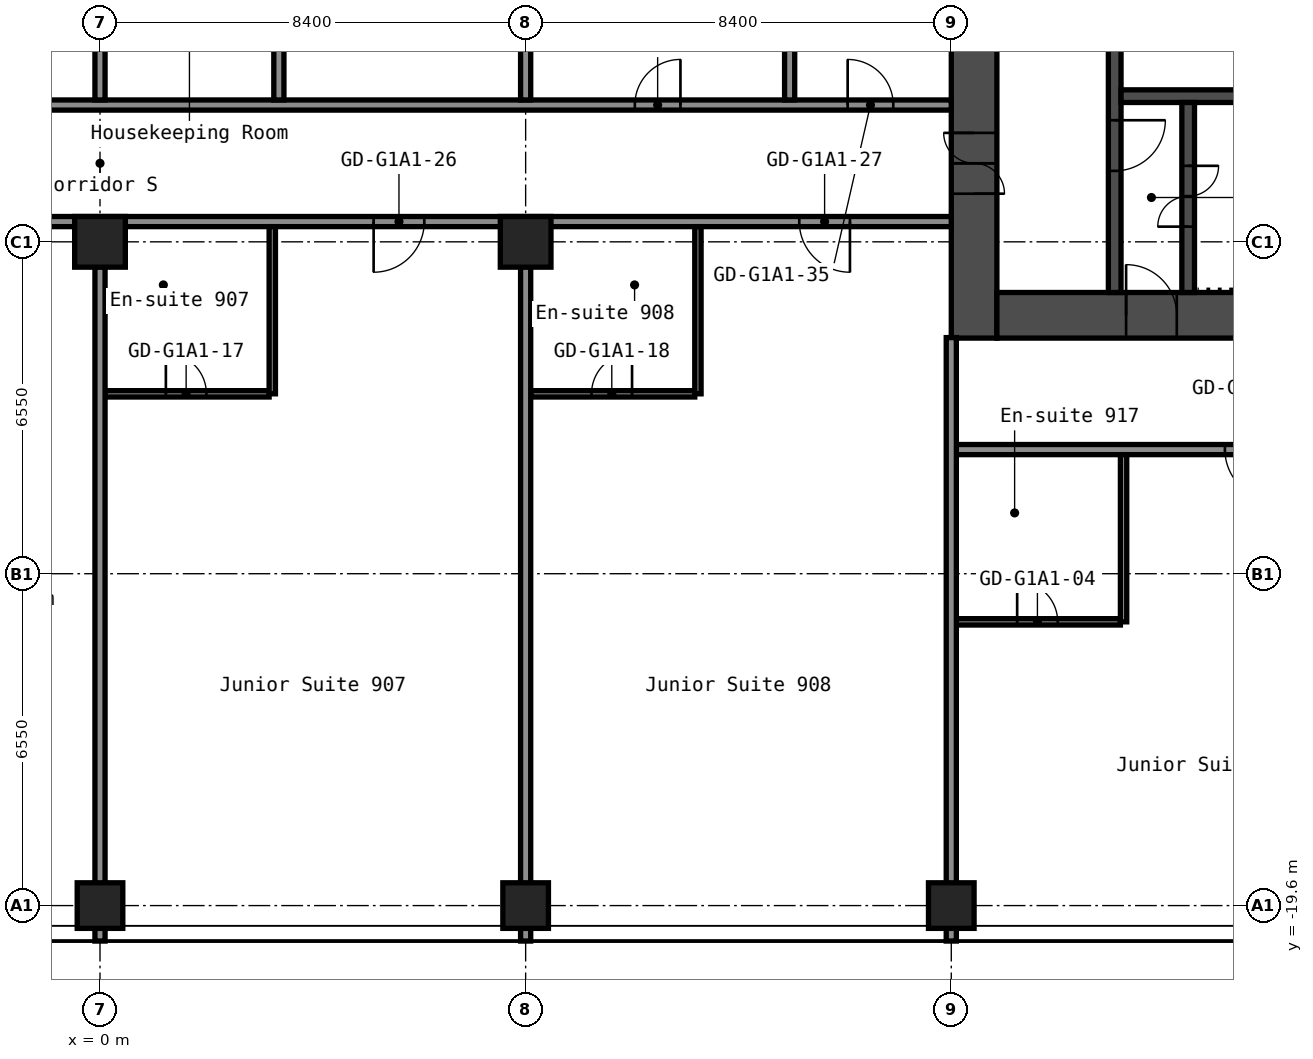
"""IFC4 building model, lengths in metres.
Left out: names, types, materials, properties, quantities, classifications, styles, units other than length and angle.
Written with IfcOpenShell. Run it as: python <this file> out.ifc"""

import sys

from ifc_helpers import new_model, si_unit, direction, frame, frame_2d, origin, origin_2d, place, context, subcontext, project, spatial, rectangle, hollow_rectangle, extrude, element, fill, save


model = new_model("IFC4")
c1 = context("Model", 3, precision=1e-05, world=origin(), true_north=direction((0.0, 1.0)))
c2 = subcontext(c1, "Body", "Model", "MODEL_VIEW")
j1 = project(units=[si_unit("LENGTHUNIT", "METRE"), si_unit("PLANEANGLEUNIT", "RADIAN")], contexts=[c1])
p1 = place(None, origin())
s1 = spatial("IfcSite", under=j1, at=p1, CompositionType="ELEMENT")
p2 = place(p1, origin())
s2 = spatial("IfcBuilding", under=s1, at=p2, CompositionType="ELEMENT")
p3 = place(p2, frame((0.0, 0.0, 35.8)))
s3 = spatial("IfcBuildingStorey", under=s2, at=p3, CompositionType="ELEMENT", Elevation=35.8)
p4 = place(p3, frame((0.0, -19.6, 0.0), z_axis=(0.0, 0.0, 1.0), x_axis=(1.0, 0.0, 0.0)))
e1 = element("IfcColumn", 1, at=p4, inside=s3, PredefinedType="COLUMN", context=c2, shape_type="SweptSolid", body=[
    extrude(hollow_rectangle(XDim=0.9, YDim=0.9, WallThickness=0.036, at=origin_2d()), origin(), (0.0, 0.0, 1.0), 2.8),
])
p5 = place(p3, frame((0.0, -6.5, 0.0), z_axis=(0.0, 0.0, 1.0), x_axis=(1.0, 0.0, 0.0)))
e2 = element("IfcColumn", 2, at=p5, inside=s3, PredefinedType="COLUMN", context=c2, shape_type="SweptSolid", body=[
    extrude(hollow_rectangle(XDim=1.0, YDim=1.0, WallThickness=0.04, at=origin_2d()), origin(), (0.0, 0.0, 1.0), 2.8),
])
p6 = place(p3, frame((8.4, -19.6, 0.0), z_axis=(0.0, 0.0, 1.0), x_axis=(1.0, 0.0, 0.0)))
e3 = element("IfcColumn", 3, at=p6, inside=s3, PredefinedType="COLUMN", context=c2, shape_type="SweptSolid", body=[
    extrude(hollow_rectangle(XDim=0.9, YDim=0.9, WallThickness=0.036, at=origin_2d()), origin(), (0.0, 0.0, 1.0), 2.8),
])
p7 = place(p3, frame((8.4, -6.5, 0.0), z_axis=(0.0, 0.0, 1.0), x_axis=(1.0, 0.0, 0.0)))
e4 = element("IfcColumn", 4, at=p7, inside=s3, PredefinedType="COLUMN", context=c2, shape_type="SweptSolid", body=[
    extrude(hollow_rectangle(XDim=1.0, YDim=1.0, WallThickness=0.04, at=origin_2d()), origin(), (0.0, 0.0, 1.0), 2.8),
])
p8 = place(p3, frame((16.8, -19.6, 0.0), z_axis=(0.0, 0.0, 1.0), x_axis=(1.0, 0.0, 0.0)))
e5 = element("IfcColumn", 5, at=p8, inside=s3, PredefinedType="COLUMN", context=c2, shape_type="SweptSolid", body=[
    extrude(hollow_rectangle(XDim=0.9, YDim=0.9, WallThickness=0.036, at=origin_2d()), origin(), (0.0, 0.0, 1.0), 2.8),
])
p9 = place(p3, frame((17.25, -8.4, 0.0), z_axis=(0.0, 0.0, 1.0), x_axis=(0.0, 1.0, 0.0)))
e6 = element("IfcWall", 6, at=p9, inside=s3, PredefinedType="SHEAR", context=c2, shape_type="SweptSolid", body=[
    extrude(rectangle(XDim=16.8, YDim=0.9, at=frame_2d((8.4, 0.0))), origin(), (0.0, 0.0, 1.0), 2.8),
])
p10 = place(p9, frame((12.75, 0.0, 0.0)))
e7 = element("IfcOpeningElement", 7, at=p10, cuts=e6, PredefinedType="OPENING", context=c2, shape_type="SweptSolid", body=[
    extrude(rectangle(XDim=1.2, YDim=2.1, at=frame_2d((0.6, 1.05))), frame((0.0, 0.46, 0.0), z_axis=(0.0, -1.0, 0.0), x_axis=(1.0, 0.0, 0.0)), (0.0, 0.0, 1.0), 0.92),
])
p11 = place(p9, frame((2.85, 0.0, 0.0)))
e8 = element("IfcOpeningElement", 8, at=p11, cuts=e6, PredefinedType="OPENING", context=c2, shape_type="SweptSolid", body=[
    extrude(rectangle(XDim=1.2, YDim=2.1, at=frame_2d((0.6, 1.05))), frame((0.0, 0.46, 0.0), z_axis=(0.0, -1.0, 0.0), x_axis=(1.0, 0.0, 0.0)), (0.0, 0.0, 1.0), 0.92),
])
p12 = place(p3, frame((17.7, -7.95, 0.0), z_axis=(0.0, 0.0, 1.0), x_axis=(1.0, 0.0, 0.0)))
e9 = element("IfcWall", 9, at=p12, inside=s3, PredefinedType="SHEAR", context=c2, shape_type="SweptSolid", body=[
    extrude(rectangle(XDim=15.0, YDim=0.9, at=frame_2d((7.5, 0.0))), origin(), (0.0, 0.0, 1.0), 2.8),
])
p13 = place(p12, frame((2.55, 0.0, 0.0)))
e10 = element("IfcOpeningElement", 10, at=p13, cuts=e9, PredefinedType="OPENING", context=c2, shape_type="SweptSolid", body=[
    extrude(rectangle(XDim=1.0, YDim=2.1, at=frame_2d((0.5, 1.05))), frame((0.0, 0.46, 0.0), z_axis=(0.0, -1.0, 0.0), x_axis=(1.0, 0.0, 0.0)), (0.0, 0.0, 1.0), 0.92),
])
p14 = place(p3, frame((20.025, -7.5, 0.0), z_axis=(0.0, 0.0, 1.0), x_axis=(0.0, 1.0, 0.0)))
e11 = element("IfcWall", 11, at=p14, inside=s3, PredefinedType="SHEAR", context=c2, shape_type="SweptSolid", body=[
    extrude(rectangle(XDim=6.3, YDim=0.25, at=frame_2d((3.15, 0.0))), origin(), (0.0, 0.0, 1.0), 2.8),
])
p15 = place(p14, frame((2.4, 0.0, 0.0)))
e12 = element("IfcOpeningElement", 12, at=p15, cuts=e11, PredefinedType="OPENING", context=c2, shape_type="SweptSolid", body=[
    extrude(rectangle(XDim=1.0, YDim=2.1, at=frame_2d((0.5, 1.05))), frame((0.0, 0.135, 0.0), z_axis=(0.0, -1.0, 0.0), x_axis=(1.0, 0.0, 0.0)), (0.0, 0.0, 1.0), 0.27),
])
p16 = place(p3, frame((20.15, -3.625, 0.0), z_axis=(0.0, 0.0, 1.0), x_axis=(1.0, 0.0, 0.0)))
e13 = element("IfcWall", 13, at=p16, inside=s3, PredefinedType="SHEAR", context=c2, shape_type="SweptSolid", body=[
    extrude(rectangle(XDim=7.5, YDim=0.25, at=frame_2d((3.75, 0.0))), origin(), (0.0, 0.0, 1.0), 2.8),
])
p17 = place(p3, frame((21.475, -7.5, 0.0), z_axis=(0.0, 0.0, 1.0), x_axis=(0.0, 1.0, 0.0)))
e14 = element("IfcWall", 14, at=p17, inside=s3, PredefinedType="SHEAR", context=c2, shape_type="SweptSolid", body=[
    extrude(rectangle(XDim=3.75, YDim=0.25, at=frame_2d((1.875, 0.0))), origin(), (0.0, 0.0, 1.0), 2.8),
])
p18 = place(p17, frame((1.3, 0.0, 0.0)))
e15 = element("IfcOpeningElement", 15, at=p18, cuts=e14, PredefinedType="OPENING", context=c2, shape_type="SweptSolid", body=[
    extrude(rectangle(XDim=1.2, YDim=2.1, at=frame_2d((0.6, 1.05))), frame((0.0, 0.135, 0.0), z_axis=(0.0, -1.0, 0.0), x_axis=(1.0, 0.0, 0.0)), (0.0, 0.0, 1.0), 0.27),
])
p19 = place(p3, frame((16.9, -14.0, 0.0), z_axis=(0.0, 0.0, 1.0), x_axis=(1.0, 0.0, 0.0)))
e16 = element("IfcWall", 16, at=p19, inside=s3, PredefinedType="PARTITIONING", context=c2, shape_type="SweptSolid", body=[
    extrude(rectangle(XDim=3.238, YDim=0.125, at=frame_2d((1.619, 0.0))), origin(), (0.0, 0.0, 1.0), 2.8),
])
p20 = place(p19, frame((1.2, 0.0, 0.0)))
e17 = element("IfcOpeningElement", 17, at=p20, cuts=e16, PredefinedType="OPENING", context=c2, shape_type="SweptSolid", body=[
    extrude(rectangle(XDim=0.8, YDim=2.1, at=frame_2d((0.4, 1.05))), frame((0.0, 0.073, 0.0), z_axis=(0.0, -1.0, 0.0), x_axis=(1.0, 0.0, 0.0)), (0.0, 0.0, 1.0), 0.145),
])
p21 = place(p3, frame((16.8, -10.6, 0.0), z_axis=(0.0, 0.0, 1.0), x_axis=(1.0, 0.0, 0.0)))
e18 = element("IfcWall", 18, at=p21, inside=s3, PredefinedType="PARTITIONING", context=c2, shape_type="SweptSolid", body=[
    extrude(rectangle(XDim=34.3, YDim=0.2, at=frame_2d((17.15, 0.0))), origin(), (0.0, 0.0, 1.0), 2.8),
])
p22 = place(p21, frame((5.4, 0.0, 0.0)))
e19 = element("IfcOpeningElement", 19, at=p22, cuts=e18, PredefinedType="OPENING", context=c2, shape_type="SweptSolid", body=[
    extrude(rectangle(XDim=1.0, YDim=2.1, at=frame_2d((0.5, 1.05))), frame((0.0, 0.11, 0.0), z_axis=(0.0, -1.0, 0.0), x_axis=(1.0, 0.0, 0.0)), (0.0, 0.0, 1.0), 0.22),
])
p23 = place(p21, frame((13.8, 0.0, 0.0)))
e20 = element("IfcOpeningElement", 20, at=p23, cuts=e18, PredefinedType="OPENING", context=c2, shape_type="SweptSolid", body=[
    extrude(rectangle(XDim=1.0, YDim=2.1, at=frame_2d((0.5, 1.05))), frame((0.0, 0.11, 0.0), z_axis=(0.0, -1.0, 0.0), x_axis=(1.0, 0.0, 0.0)), (0.0, 0.0, 1.0), 0.22),
])
p24 = place(p21, frame((18.8, 0.0, 0.0)))
e21 = element("IfcOpeningElement", 21, at=p24, cuts=e18, PredefinedType="OPENING", context=c2, shape_type="SweptSolid", body=[
    extrude(rectangle(XDim=1.0, YDim=2.1, at=frame_2d((0.5, 1.05))), frame((0.0, 0.11, 0.0), z_axis=(0.0, -1.0, 0.0), x_axis=(1.0, 0.0, 0.0)), (0.0, 0.0, 1.0), 0.22),
])
p25 = place(p21, frame((30.8, 0.0, 0.0)))
e22 = element("IfcOpeningElement", 22, at=p25, cuts=e18, PredefinedType="OPENING", context=c2, shape_type="SweptSolid", body=[
    extrude(rectangle(XDim=1.0, YDim=2.1, at=frame_2d((0.5, 1.05))), frame((0.0, 0.11, 0.0), z_axis=(0.0, -1.0, 0.0), x_axis=(1.0, 0.0, 0.0)), (0.0, 0.0, 1.0), 0.22),
])
p26 = place(p3, frame((0.1, -9.5, 0.0), z_axis=(0.0, 0.0, 1.0), x_axis=(1.0, 0.0, 0.0)))
e23 = element("IfcWall", 23, at=p26, inside=s3, PredefinedType="PARTITIONING", context=c2, shape_type="SweptSolid", body=[
    extrude(rectangle(XDim=3.237, YDim=0.125, at=frame_2d((1.619, 0.0))), origin(), (0.0, 0.0, 1.0), 2.8),
])
p27 = place(p26, frame((1.2, 0.0, 0.0)))
e24 = element("IfcOpeningElement", 24, at=p27, cuts=e23, PredefinedType="OPENING", context=c2, shape_type="SweptSolid", body=[
    extrude(rectangle(XDim=0.8, YDim=2.1, at=frame_2d((0.4, 1.05))), frame((0.0, 0.073, 0.0), z_axis=(0.0, -1.0, 0.0), x_axis=(1.0, 0.0, 0.0)), (0.0, 0.0, 1.0), 0.145),
])
p28 = place(p3, frame((8.5, -9.5, 0.0), z_axis=(0.0, 0.0, 1.0), x_axis=(1.0, 0.0, 0.0)))
e25 = element("IfcWall", 25, at=p28, inside=s3, PredefinedType="PARTITIONING", context=c2, shape_type="SweptSolid", body=[
    extrude(rectangle(XDim=3.238, YDim=0.125, at=frame_2d((1.619, 0.0))), origin(), (0.0, 0.0, 1.0), 2.8),
])
p29 = place(p28, frame((1.2, 0.0, 0.0)))
e26 = element("IfcOpeningElement", 26, at=p29, cuts=e25, PredefinedType="OPENING", context=c2, shape_type="SweptSolid", body=[
    extrude(rectangle(XDim=0.8, YDim=2.1, at=frame_2d((0.4, 1.05))), frame((0.0, 0.073, 0.0), z_axis=(0.0, -1.0, 0.0), x_axis=(1.0, 0.0, 0.0)), (0.0, 0.0, 1.0), 0.145),
])
p30 = place(p3, frame((-16.8, -6.1, 0.0), z_axis=(0.0, 0.0, 1.0), x_axis=(1.0, 0.0, 0.0)))
e27 = element("IfcWall", 27, at=p30, inside=s3, PredefinedType="PARTITIONING", context=c2, shape_type="SweptSolid", body=[
    extrude(rectangle(XDim=33.6, YDim=0.2, at=frame_2d((16.8, 0.0))), origin(), (0.0, 0.0, 1.0), 2.8),
])
p31 = place(p30, frame((5.4, 0.0, 0.0)))
e28 = element("IfcOpeningElement", 28, at=p31, cuts=e27, PredefinedType="OPENING", context=c2, shape_type="SweptSolid", body=[
    extrude(rectangle(XDim=1.0, YDim=2.1, at=frame_2d((0.5, 1.05))), frame((0.0, 0.11, 0.0), z_axis=(0.0, -1.0, 0.0), x_axis=(1.0, 0.0, 0.0)), (0.0, 0.0, 1.0), 0.22),
])
p32 = place(p30, frame((9.545, 0.0, 0.0)))
e29 = element("IfcOpeningElement", 29, at=p32, cuts=e27, PredefinedType="OPENING", context=c2, shape_type="SweptSolid", body=[
    extrude(rectangle(XDim=0.9, YDim=2.1, at=frame_2d((0.45, 1.05))), frame((0.0, 0.11, 0.0), z_axis=(0.0, -1.0, 0.0), x_axis=(1.0, 0.0, 0.0)), (0.0, 0.0, 1.0), 0.22),
])
p33 = place(p30, frame((13.745, 0.0, 0.0)))
e30 = element("IfcOpeningElement", 30, at=p33, cuts=e27, PredefinedType="OPENING", context=c2, shape_type="SweptSolid", body=[
    extrude(rectangle(XDim=0.9, YDim=2.1, at=frame_2d((0.45, 1.05))), frame((0.0, 0.11, 0.0), z_axis=(0.0, -1.0, 0.0), x_axis=(1.0, 0.0, 0.0)), (0.0, 0.0, 1.0), 0.22),
])
p34 = place(p30, frame((22.2, 0.0, 0.0)))
e31 = element("IfcOpeningElement", 31, at=p34, cuts=e27, PredefinedType="OPENING", context=c2, shape_type="SweptSolid", body=[
    extrude(rectangle(XDim=1.0, YDim=2.1, at=frame_2d((0.5, 1.05))), frame((0.0, 0.11, 0.0), z_axis=(0.0, -1.0, 0.0), x_axis=(1.0, 0.0, 0.0)), (0.0, 0.0, 1.0), 0.22),
])
p35 = place(p30, frame((30.6, 0.0, 0.0)))
e32 = element("IfcOpeningElement", 32, at=p35, cuts=e27, PredefinedType="OPENING", context=c2, shape_type="SweptSolid", body=[
    extrude(rectangle(XDim=1.0, YDim=2.1, at=frame_2d((0.5, 1.05))), frame((0.0, 0.11, 0.0), z_axis=(0.0, -1.0, 0.0), x_axis=(1.0, 0.0, 0.0)), (0.0, 0.0, 1.0), 0.22),
])
p36 = place(p3, frame((-16.8, -3.8, 0.0), z_axis=(0.0, 0.0, 1.0), x_axis=(1.0, 0.0, 0.0)))
e33 = element("IfcWall", 33, at=p36, inside=s3, PredefinedType="PARTITIONING", context=c2, shape_type="SweptSolid", body=[
    extrude(rectangle(XDim=33.6, YDim=0.2, at=frame_2d((16.8, 0.0))), origin(), (0.0, 0.0, 1.0), 2.8),
])
p37 = place(p36, frame((9.8, 0.0, 0.0)))
e34 = element("IfcOpeningElement", 34, at=p37, cuts=e33, PredefinedType="OPENING", context=c2, shape_type="SweptSolid", body=[
    extrude(rectangle(XDim=0.9, YDim=2.1, at=frame_2d((0.45, 1.05))), frame((0.0, 0.11, 0.0), z_axis=(0.0, -1.0, 0.0), x_axis=(1.0, 0.0, 0.0)), (0.0, 0.0, 1.0), 0.22),
])
p38 = place(p36, frame((14.0, 0.0, 0.0)))
e35 = element("IfcOpeningElement", 35, at=p38, cuts=e33, PredefinedType="OPENING", context=c2, shape_type="SweptSolid", body=[
    extrude(rectangle(XDim=0.9, YDim=2.1, at=frame_2d((0.45, 1.05))), frame((0.0, 0.11, 0.0), z_axis=(0.0, -1.0, 0.0), x_axis=(1.0, 0.0, 0.0)), (0.0, 0.0, 1.0), 0.22),
])
p39 = place(p36, frame((27.355, 0.0, 0.0)))
e36 = element("IfcOpeningElement", 36, at=p39, cuts=e33, PredefinedType="OPENING", context=c2, shape_type="SweptSolid", body=[
    extrude(rectangle(XDim=0.9, YDim=2.1, at=frame_2d((0.45, 1.05))), frame((0.0, 0.11, 0.0), z_axis=(0.0, -1.0, 0.0), x_axis=(1.0, 0.0, 0.0)), (0.0, 0.0, 1.0), 0.22),
])
p40 = place(p36, frame((31.555, 0.0, 0.0)))
e37 = element("IfcOpeningElement", 37, at=p40, cuts=e33, PredefinedType="OPENING", context=c2, shape_type="SweptSolid", body=[
    extrude(rectangle(XDim=0.9, YDim=2.1, at=frame_2d((0.45, 1.05))), frame((0.0, 0.11, 0.0), z_axis=(0.0, -1.0, 0.0), x_axis=(1.0, 0.0, 0.0)), (0.0, 0.0, 1.0), 0.22),
])
p41 = place(p3, frame((0.0, -20.3, 0.0), z_axis=(0.0, 0.0, 1.0), x_axis=(0.0, 1.0, 0.0)))
e38 = element("IfcWall", 38, at=p41, inside=s3, PredefinedType="PARTITIONING", context=c2, shape_type="SweptSolid", body=[
    extrude(rectangle(XDim=13.31, YDim=0.2, at=frame_2d((6.655, 0.0))), origin(), (0.0, 0.0, 1.0), 2.8),
])
p42 = place(p3, frame((0.0, -3.7, 0.0), z_axis=(0.0, 0.0, 1.0), x_axis=(0.0, 1.0, 0.0)))
e39 = element("IfcWall", 39, at=p42, inside=s3, PredefinedType="PARTITIONING", context=c2, shape_type="SweptSolid", body=[
    extrude(rectangle(XDim=7.4, YDim=0.2, at=frame_2d((3.7, 0.0))), origin(), (0.0, 0.0, 1.0), 2.8),
])
p43 = place(p3, frame((3.4, -9.5, 0.0), z_axis=(0.0, 0.0, 1.0), x_axis=(0.0, 1.0, 0.0)))
e40 = element("IfcWall", 40, at=p43, inside=s3, PredefinedType="PARTITIONING", context=c2, shape_type="SweptSolid", body=[
    extrude(rectangle(XDim=3.3, YDim=0.125, at=frame_2d((1.65, 0.0))), origin(), (0.0, 0.0, 1.0), 2.8),
])
p44 = place(p3, frame((3.53, -3.7, 0.0), z_axis=(0.0, 0.0, 1.0), x_axis=(0.0, 1.0, 0.0)))
e41 = element("IfcWall", 41, at=p44, inside=s3, PredefinedType="PARTITIONING", context=c2, shape_type="SweptSolid", body=[
    extrude(rectangle(XDim=7.4, YDim=0.2, at=frame_2d((3.7, 0.0))), origin(), (0.0, 0.0, 1.0), 2.8),
])
p45 = place(p3, frame((8.4, -20.3, 0.0), z_axis=(0.0, 0.0, 1.0), x_axis=(0.0, 1.0, 0.0)))
e42 = element("IfcWall", 42, at=p45, inside=s3, PredefinedType="PARTITIONING", context=c2, shape_type="SweptSolid", body=[
    extrude(rectangle(XDim=13.31, YDim=0.2, at=frame_2d((6.655, 0.0))), origin(), (0.0, 0.0, 1.0), 2.8),
])
p46 = place(p3, frame((8.4, -3.7, 0.0), z_axis=(0.0, 0.0, 1.0), x_axis=(0.0, 1.0, 0.0)))
e43 = element("IfcWall", 43, at=p46, inside=s3, PredefinedType="PARTITIONING", context=c2, shape_type="SweptSolid", body=[
    extrude(rectangle(XDim=7.4, YDim=0.2, at=frame_2d((3.7, 0.0))), origin(), (0.0, 0.0, 1.0), 2.8),
])
p47 = place(p3, frame((11.8, -9.5, 0.0), z_axis=(0.0, 0.0, 1.0), x_axis=(0.0, 1.0, 0.0)))
e44 = element("IfcWall", 44, at=p47, inside=s3, PredefinedType="PARTITIONING", context=c2, shape_type="SweptSolid", body=[
    extrude(rectangle(XDim=3.3, YDim=0.125, at=frame_2d((1.65, 0.0))), origin(), (0.0, 0.0, 1.0), 2.8),
])
p48 = place(p3, frame((13.61, -3.7, 0.0), z_axis=(0.0, 0.0, 1.0), x_axis=(0.0, 1.0, 0.0)))
e45 = element("IfcWall", 45, at=p48, inside=s3, PredefinedType="PARTITIONING", context=c2, shape_type="SweptSolid", body=[
    extrude(rectangle(XDim=7.4, YDim=0.2, at=frame_2d((3.7, 0.0))), origin(), (0.0, 0.0, 1.0), 2.8),
])
p49 = place(p3, frame((16.8, -20.3, 0.0), z_axis=(0.0, 0.0, 1.0), x_axis=(0.0, 1.0, 0.0)))
e46 = element("IfcWall", 46, at=p49, inside=s3, PredefinedType="PARTITIONING", context=c2, shape_type="SweptSolid", body=[
    extrude(rectangle(XDim=11.91, YDim=0.2, at=frame_2d((5.955, 0.0))), origin(), (0.0, 0.0, 1.0), 2.8),
])
p50 = place(p3, frame((20.2, -14.0, 0.0), z_axis=(0.0, 0.0, 1.0), x_axis=(0.0, 1.0, 0.0)))
e47 = element("IfcWall", 47, at=p50, inside=s3, PredefinedType="PARTITIONING", context=c2, shape_type="SweptSolid", body=[
    extrude(rectangle(XDim=3.3, YDim=0.125, at=frame_2d((1.65, 0.0))), origin(), (0.0, 0.0, 1.0), 2.8),
])
p51 = place(p11, origin())
e48 = element("IfcDoor", 48, at=p51, inside=s3, OperationType="DOUBLE_DOOR_SINGLE_SWING", PredefinedType="DOOR", context=c2, shape_type="SweptSolid", body=[
    extrude(rectangle(XDim=1.2, YDim=2.1, at=frame_2d((0.6, 1.05))), frame((0.0, 0.025, 0.0), z_axis=(0.0, -1.0, 0.0), x_axis=(1.0, 0.0, 0.0)), (0.0, 0.0, 1.0), 0.05),
])
fill(e8, e48)
p52 = place(p13, origin())
e49 = element("IfcDoor", 49, at=p52, inside=s3, OperationType="SINGLE_SWING_RIGHT", PredefinedType="DOOR", context=c2, shape_type="SweptSolid", body=[
    extrude(rectangle(XDim=1.0, YDim=2.1, at=frame_2d((0.5, 1.05))), frame((0.0, 0.025, 0.0), z_axis=(0.0, -1.0, 0.0), x_axis=(1.0, 0.0, 0.0)), (0.0, 0.0, 1.0), 0.05),
])
fill(e10, e49)
p53 = place(p18, origin())
e50 = element("IfcDoor", 50, at=p53, inside=s3, OperationType="DOUBLE_DOOR_SINGLE_SWING", PredefinedType="DOOR", context=c2, shape_type="SweptSolid", body=[
    extrude(rectangle(XDim=1.2, YDim=2.1, at=frame_2d((0.6, 1.05))), frame((0.0, 0.025, 0.0), z_axis=(0.0, -1.0, 0.0), x_axis=(1.0, 0.0, 0.0)), (0.0, 0.0, 1.0), 0.05),
])
fill(e15, e50)
p54 = place(p15, origin())
e51 = element("IfcDoor", 51, at=p54, inside=s3, OperationType="SINGLE_SWING_RIGHT", PredefinedType="DOOR", context=c2, shape_type="SweptSolid", body=[
    extrude(rectangle(XDim=1.0, YDim=2.1, at=frame_2d((0.5, 1.05))), frame((0.0, 0.025, 0.0), z_axis=(0.0, -1.0, 0.0), x_axis=(1.0, 0.0, 0.0)), (0.0, 0.0, 1.0), 0.05),
])
fill(e12, e51)
p55 = place(p20, origin())
e52 = element("IfcDoor", 52, at=p55, inside=s3, OperationType="SINGLE_SWING_RIGHT", PredefinedType="DOOR", context=c2, shape_type="SweptSolid", body=[
    extrude(rectangle(XDim=0.8, YDim=2.1, at=frame_2d((0.4, 1.05))), frame((0.0, 0.025, 0.0), z_axis=(0.0, -1.0, 0.0), x_axis=(1.0, 0.0, 0.0)), (0.0, 0.0, 1.0), 0.05),
])
fill(e17, e52)
p56 = place(p22, origin())
e53 = element("IfcDoor", 53, at=p56, inside=s3, OperationType="SINGLE_SWING_RIGHT", PredefinedType="DOOR", context=c2, shape_type="SweptSolid", body=[
    extrude(rectangle(XDim=1.0, YDim=2.1, at=frame_2d((0.5, 1.05))), frame((0.0, 0.025, 0.0), z_axis=(0.0, -1.0, 0.0), x_axis=(1.0, 0.0, 0.0)), (0.0, 0.0, 1.0), 0.05),
])
fill(e19, e53)
p57 = place(p27, origin())
e54 = element("IfcDoor", 54, at=p57, inside=s3, OperationType="SINGLE_SWING_RIGHT", PredefinedType="DOOR", context=c2, shape_type="SweptSolid", body=[
    extrude(rectangle(XDim=0.8, YDim=2.1, at=frame_2d((0.4, 1.05))), frame((0.0, 0.025, 0.0), z_axis=(0.0, -1.0, 0.0), x_axis=(1.0, 0.0, 0.0)), (0.0, 0.0, 1.0), 0.05),
])
fill(e24, e54)
p58 = place(p29, origin())
e55 = element("IfcDoor", 55, at=p58, inside=s3, OperationType="SINGLE_SWING_LEFT", PredefinedType="DOOR", context=c2, shape_type="SweptSolid", body=[
    extrude(rectangle(XDim=0.8, YDim=2.1, at=frame_2d((0.4, 1.05))), frame((0.0, 0.025, 0.0), z_axis=(0.0, -1.0, 0.0), x_axis=(1.0, 0.0, 0.0)), (0.0, 0.0, 1.0), 0.05),
])
fill(e26, e55)
p59 = place(p34, origin())
e56 = element("IfcDoor", 56, at=p59, inside=s3, OperationType="SINGLE_SWING_LEFT", PredefinedType="DOOR", context=c2, shape_type="SweptSolid", body=[
    extrude(rectangle(XDim=1.0, YDim=2.1, at=frame_2d((0.5, 1.05))), frame((0.0, 0.025, 0.0), z_axis=(0.0, -1.0, 0.0), x_axis=(1.0, 0.0, 0.0)), (0.0, 0.0, 1.0), 0.05),
])
fill(e31, e56)
p60 = place(p35, origin())
e57 = element("IfcDoor", 57, at=p60, inside=s3, OperationType="SINGLE_SWING_RIGHT", PredefinedType="DOOR", context=c2, shape_type="SweptSolid", body=[
    extrude(rectangle(XDim=1.0, YDim=2.1, at=frame_2d((0.5, 1.05))), frame((0.0, 0.025, 0.0), z_axis=(0.0, -1.0, 0.0), x_axis=(1.0, 0.0, 0.0)), (0.0, 0.0, 1.0), 0.05),
])
fill(e32, e57)
p61 = place(p39, origin())
e58 = element("IfcDoor", 58, at=p61, inside=s3, OperationType="SINGLE_SWING_LEFT", PredefinedType="DOOR", context=c2, shape_type="SweptSolid", body=[
    extrude(rectangle(XDim=0.9, YDim=2.1, at=frame_2d((0.45, 1.05))), frame((0.0, 0.025, 0.0), z_axis=(0.0, -1.0, 0.0), x_axis=(1.0, 0.0, 0.0)), (0.0, 0.0, 1.0), 0.05),
])
fill(e36, e58)
p62 = place(p40, origin())
e59 = element("IfcDoor", 59, at=p62, inside=s3, OperationType="SINGLE_SWING_RIGHT", PredefinedType="DOOR", context=c2, shape_type="SweptSolid", body=[
    extrude(rectangle(XDim=0.9, YDim=2.1, at=frame_2d((0.45, 1.05))), frame((0.0, 0.025, 0.0), z_axis=(0.0, -1.0, 0.0), x_axis=(1.0, 0.0, 0.0)), (0.0, 0.0, 1.0), 0.05),
])
fill(e37, e59)
save(model, sys.argv[1])
